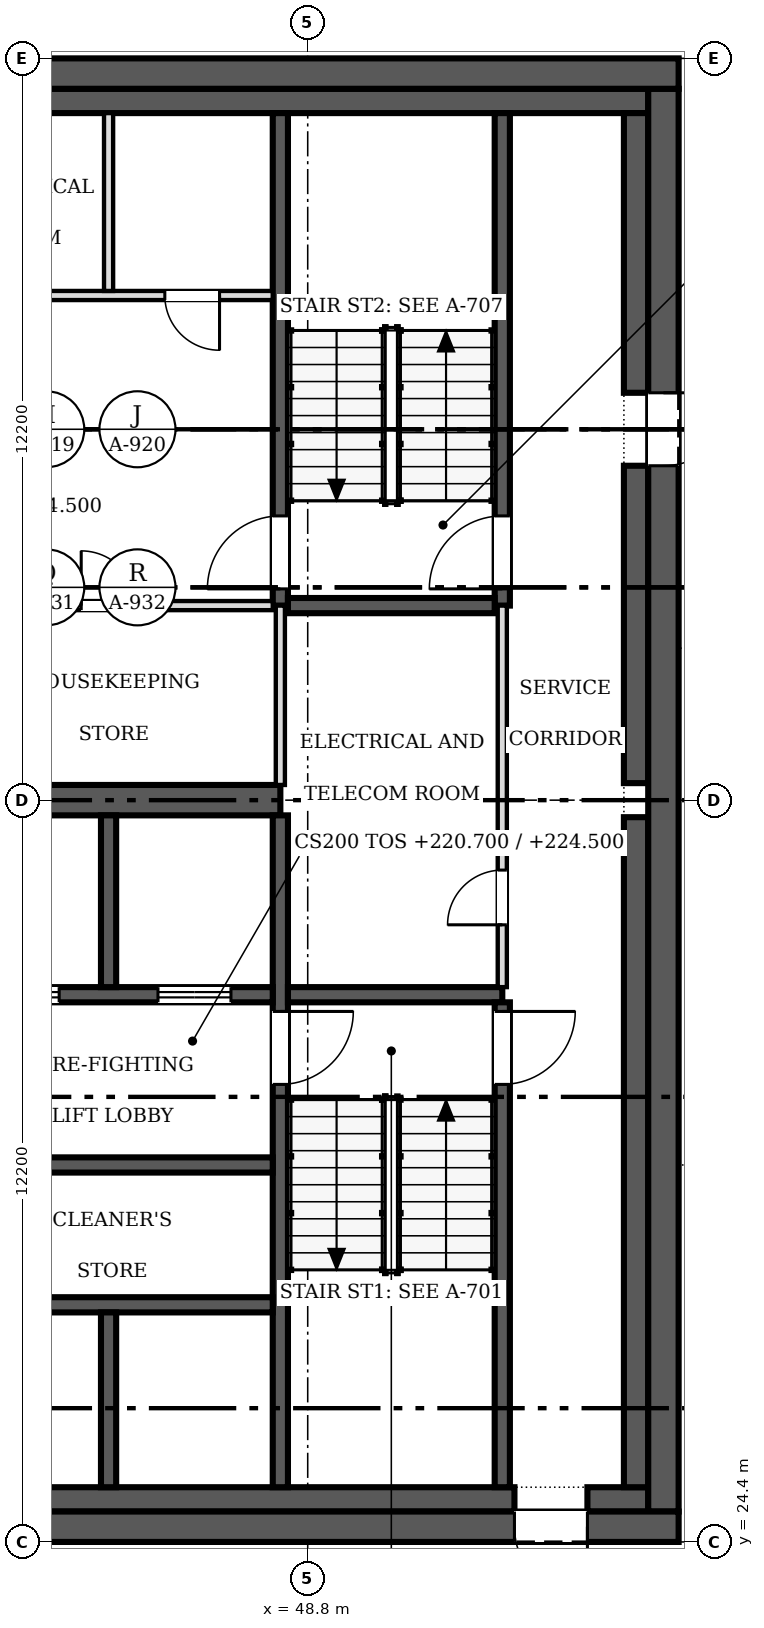
"""IFC4 building model, lengths in metres.
Left out: names, types, materials, properties, quantities, classifications, styles, units other than length and angle.
Written with IfcOpenShell. Run it as: python <this file> out.ifc"""

import sys

from ifc_helpers import new_model, si_unit, direction, frame, frame_2d, origin, place, context, subcontext, project, spatial, rectangle, extrude, source, transform, mapped, element, fill, save


model = new_model("IFC4")
c1 = context("Model", 3, precision=1e-05, world=origin(), true_north=direction((0.0, 1.0)))
c2 = subcontext(c1, "Body", "Model", "MODEL_VIEW")
j1 = project(units=[si_unit("LENGTHUNIT", "METRE"), si_unit("PLANEANGLEUNIT", "RADIAN")], contexts=[c1])
p1 = place(None, origin())
s1 = spatial("IfcSite", under=j1, at=p1, CompositionType="ELEMENT")
p2 = place(p1, origin())
s2 = spatial("IfcBuilding", under=s1, at=p2, CompositionType="ELEMENT")
p3 = place(p2, frame((0.0, 0.0, 220.7)))
s3 = spatial("IfcBuildingStorey", under=s2, at=p3, CompositionType="ELEMENT", Elevation=220.7)
p4 = place(p3, frame((54.9, 24.65, 0.0), z_axis=(0.0, 0.0, 1.0), x_axis=(-1.0, 0.0, 0.0)))
e1 = element("IfcWall", 1, at=p4, inside=s3, PredefinedType="SHEAR", context=c2, shape_type="SweptSolid", body=[
    extrude(rectangle(XDim=24.4, YDim=0.5, at=frame_2d((12.2, 0.0))), origin(), (0.0, 0.0, 1.0), 3.8),
])
m1 = source(origin(), c2, "Body", "SweptSolid", [
    extrude(rectangle(XDim=1.2, YDim=2.1, at=frame_2d((0.6, 1.05))), frame((0.0, 0.26, 0.0), z_axis=(0.0, -1.0, 0.0), x_axis=(1.0, 0.0, 0.0)), (0.0, 0.0, 1.0), 0.52),
])
p5 = place(p4, frame((1.5, 0.0, 0.0)))
e2 = element("IfcOpeningElement", 2, at=p5, cuts=e1, PredefinedType="OPENING", context=c2, shape_type="MappedRepresentation", body=[
    mapped(m1, transform((0.0, 0.0, 0.0), scale=1.0)),
])
p6 = place(p3, frame((30.5, 48.55, 0.0), z_axis=(0.0, 0.0, 1.0), x_axis=(1.0, 0.0, 0.0)))
e3 = element("IfcWall", 3, at=p6, inside=s3, PredefinedType="SHEAR", context=c2, shape_type="SweptSolid", body=[
    extrude(rectangle(XDim=24.4, YDim=0.5, at=frame_2d((12.2, 0.0))), origin(), (0.0, 0.0, 1.0), 3.8),
])
p7 = place(p3, frame((54.65, 48.3, 0.0), z_axis=(0.0, 0.0, 1.0), x_axis=(0.0, -1.0, 0.0)))
e4 = element("IfcWall", 4, at=p7, inside=s3, PredefinedType="SHEAR", context=c2, shape_type="SweptSolid", body=[
    extrude(rectangle(XDim=23.4, YDim=0.5, at=frame_2d((11.7, 0.0))), origin(), (0.0, 0.0, 1.0), 3.8),
])
p8 = place(p7, frame((5.0, 0.0, 0.0)))
e5 = element("IfcOpeningElement", 5, at=p8, cuts=e4, PredefinedType="OPENING", context=c2, shape_type="MappedRepresentation", body=[
    mapped(m1, transform((0.0, 0.0, 0.0), scale=1.0)),
])
p9 = place(p3, frame((31.0, 25.1, 0.0), z_axis=(0.0, 0.0, 1.0), x_axis=(1.0, 0.0, 0.0)))
e6 = element("IfcWall", 6, at=p9, inside=s3, PredefinedType="SOLIDWALL", context=c2, shape_type="SweptSolid", body=[
    extrude(rectangle(XDim=21.2, YDim=0.4, at=frame_2d((10.6, 0.0))), origin(), (0.0, 0.0, 1.0), 3.8),
])
p10 = place(p3, frame((53.4, 25.1, 0.0), z_axis=(0.0, 0.0, 1.0), x_axis=(1.0, 0.0, 0.0)))
e7 = element("IfcWall", 7, at=p10, inside=s3, PredefinedType="SOLIDWALL", context=c2, shape_type="SweptSolid", body=[
    extrude(rectangle(XDim=1.0, YDim=0.4, at=frame_2d((0.5, 0.0))), origin(), (0.0, 0.0, 1.0), 3.8),
])
p11 = place(p3, frame((31.0, 48.1, 0.0), z_axis=(0.0, 0.0, 1.0), x_axis=(1.0, 0.0, 0.0)))
e8 = element("IfcWall", 8, at=p11, inside=s3, PredefinedType="SOLIDWALL", context=c2, shape_type="SweptSolid", body=[
    extrude(rectangle(XDim=23.4, YDim=0.4, at=frame_2d((11.7, 0.0))), origin(), (0.0, 0.0, 1.0), 3.8),
])
p12 = place(p3, frame((54.2, 25.3, 0.0), z_axis=(0.0, 0.0, 1.0), x_axis=(0.0, 1.0, 0.0)))
e9 = element("IfcWall", 9, at=p12, inside=s3, PredefinedType="SOLIDWALL", context=c2, shape_type="SweptSolid", body=[
    extrude(rectangle(XDim=11.02, YDim=0.4, at=frame_2d((5.51, 0.0))), origin(), (0.0, 0.0, 1.0), 3.8),
])
p13 = place(p3, frame((54.2, 36.88, 0.0), z_axis=(0.0, 0.0, 1.0), x_axis=(0.0, 1.0, 0.0)))
e10 = element("IfcWall", 10, at=p13, inside=s3, PredefinedType="SOLIDWALL", context=c2, shape_type="SweptSolid", body=[
    extrude(rectangle(XDim=5.22, YDim=0.4, at=frame_2d((2.61, 0.0))), origin(), (0.0, 0.0, 1.0), 3.8),
])
p14 = place(p3, frame((54.2, 43.3, 0.0), z_axis=(0.0, 0.0, 1.0), x_axis=(0.0, 1.0, 0.0)))
e11 = element("IfcWall", 11, at=p14, inside=s3, PredefinedType="SOLIDWALL", context=c2, shape_type="SweptSolid", body=[
    extrude(rectangle(XDim=4.6, YDim=0.4, at=frame_2d((2.3, 0.0))), origin(), (0.0, 0.0, 1.0), 3.8),
])
p15 = place(p3, frame((31.4, 36.6, 0.0), z_axis=(0.0, 0.0, 1.0), x_axis=(1.0, 0.0, 0.0)))
e12 = element("IfcWall", 12, at=p15, inside=s3, PredefinedType="SHEAR", context=c2, shape_type="SweptSolid", body=[
    extrude(rectangle(XDim=16.95, YDim=0.5, at=frame_2d((8.475, 0.0))), origin(), (0.0, 0.0, 1.0), 3.8),
])
p16 = place(p3, frame((48.35, 36.35, 0.0), z_axis=(0.0, 0.0, 1.0), x_axis=(0.0, -1.0, 0.0)))
e13 = element("IfcWall", 13, at=p16, inside=s3, PredefinedType="SOLIDWALL", context=c2, shape_type="SweptSolid", body=[
    extrude(rectangle(XDim=11.05, YDim=0.25, at=frame_2d((5.525, 0.0))), origin(), (0.0, 0.0, 1.0), 3.8),
])
m2 = source(origin(), c2, "Body", "SweptSolid", [
    extrude(rectangle(XDim=1.2, YDim=2.1, at=frame_2d((0.6, 1.05))), frame((0.0, 0.135, 0.0), z_axis=(0.0, -1.0, 0.0), x_axis=(1.0, 0.0, 0.0)), (0.0, 0.0, 1.0), 0.27),
])
p17 = place(p16, frame((3.225, 0.0, 0.0)))
e14 = element("IfcOpeningElement", 14, at=p17, cuts=e13, PredefinedType="OPENING", context=c2, shape_type="MappedRepresentation", body=[
    mapped(m2, transform((0.0, 0.0, 0.0), scale=1.0)),
])
p18 = place(p3, frame((48.225, 33.4, 0.0), z_axis=(0.0, 0.0, 1.0), x_axis=(-1.0, 0.0, 0.0)))
e15 = element("IfcWall", 15, at=p18, inside=s3, PredefinedType="SOLIDWALL", context=c2, shape_type="SweptSolid", body=[
    extrude(rectangle(XDim=5.275, YDim=0.25, at=frame_2d((2.638, 0.0))), origin(), (0.0, 0.0, 1.0), 3.8),
])
p19 = place(p18, frame((3.512, 0.0, 0.0)))
e16 = element("IfcOpeningElement", 16, at=p19, cuts=e15, PredefinedType="OPENING", context=c2, shape_type="MappedRepresentation", body=[
    mapped(m2, transform((0.0, 0.0, 0.0), scale=1.0)),
])
p20 = place(p18, frame((0.688, 0.0, 0.0)))
e17 = element("IfcOpeningElement", 17, at=p20, cuts=e15, PredefinedType="OPENING", context=c2, shape_type="MappedRepresentation", body=[
    mapped(m2, transform((0.0, 0.0, 0.0), scale=1.0)),
])
p21 = place(p3, frame((48.475, 33.4, 0.0), z_axis=(0.0, 0.0, 1.0), x_axis=(1.0, 0.0, 0.0)))
e18 = element("IfcWall", 18, at=p21, inside=s3, PredefinedType="SOLIDWALL", context=c2, shape_type="SweptSolid", body=[
    extrude(rectangle(XDim=3.525, YDim=0.25, at=frame_2d((1.762, 0.0))), origin(), (0.0, 0.0, 1.0), 3.8),
])
p22 = place(p3, frame((48.35, 47.9, 0.0), z_axis=(0.0, 0.0, 1.0), x_axis=(0.0, -1.0, 0.0)))
e19 = element("IfcWall", 19, at=p22, inside=s3, PredefinedType="SOLIDWALL", context=c2, shape_type="SweptSolid", body=[
    extrude(rectangle(XDim=8.1, YDim=0.25, at=frame_2d((4.05, 0.0))), origin(), (0.0, 0.0, 1.0), 3.8),
])
p23 = place(p22, frame((6.625, 0.0, 0.0)))
e20 = element("IfcOpeningElement", 20, at=p23, cuts=e19, PredefinedType="OPENING", context=c2, shape_type="MappedRepresentation", body=[
    mapped(m2, transform((0.0, 0.0, 0.0), scale=1.0)),
])
p24 = place(p3, frame((52.0, 25.3, 0.0), z_axis=(0.0, 0.0, 1.0), x_axis=(0.0, 1.0, 0.0)))
e21 = element("IfcWall", 21, at=p24, inside=s3, PredefinedType="SOLIDWALL", context=c2, shape_type="SweptSolid", body=[
    extrude(rectangle(XDim=7.975, YDim=0.25, at=frame_2d((3.987, 0.0))), origin(), (0.0, 0.0, 1.0), 3.8),
])
p25 = place(p24, frame((6.625, 0.0, 0.0)))
e22 = element("IfcOpeningElement", 22, at=p25, cuts=e21, PredefinedType="OPENING", context=c2, shape_type="MappedRepresentation", body=[
    mapped(m2, transform((0.0, 0.0, 0.0), scale=1.0)),
])
p26 = place(p3, frame((52.0, 39.8, 0.0), z_axis=(0.0, 0.0, 1.0), x_axis=(0.0, 1.0, 0.0)))
e23 = element("IfcWall", 23, at=p26, inside=s3, PredefinedType="SOLIDWALL", context=c2, shape_type="SweptSolid", body=[
    extrude(rectangle(XDim=8.1, YDim=0.25, at=frame_2d((4.05, 0.0))), origin(), (0.0, 0.0, 1.0), 3.8),
])
p27 = place(p26, frame((0.275, 0.0, 0.0)))
e24 = element("IfcOpeningElement", 24, at=p27, cuts=e23, PredefinedType="OPENING", context=c2, shape_type="MappedRepresentation", body=[
    mapped(m2, transform((0.0, 0.0, 0.0), scale=1.0)),
])
for number, where, z_axis, x_axis in (
    (25, (42.95, 28.3, 0.0), (0.0, 0.0, 1.0), (1.0, 0.0, 0.0)),
    (26, (42.95, 30.6, 0.0), (0.0, 0.0, 1.0), (1.0, 0.0, 0.0)),
):
    element("IfcWall", number, at=place(p3, frame(where, z_axis=z_axis, x_axis=x_axis)), inside=s3, PredefinedType="SOLIDWALL", context=c2, shape_type="SweptSolid", body=[
        extrude(rectangle(XDim=5.275, YDim=0.25, at=frame_2d((2.638, 0.0))), origin(), (0.0, 0.0, 1.0), 3.8),
    ])
p28 = place(p3, frame((48.475, 39.8, 0.0), z_axis=(0.0, 0.0, 1.0), x_axis=(1.0, 0.0, 0.0)))
e27 = element("IfcWall", 27, at=p28, inside=s3, PredefinedType="SOLIDWALL", context=c2, shape_type="SweptSolid", body=[
    extrude(rectangle(XDim=3.4, YDim=0.25, at=frame_2d((1.7, 0.0))), origin(), (0.0, 0.0, 1.0), 3.8),
])
p29 = place(p3, frame((45.525, 33.525, 0.0), z_axis=(0.0, 0.0, 1.0), x_axis=(0.0, 1.0, 0.0)))
e28 = element("IfcWall", 28, at=p29, inside=s3, PredefinedType="SOLIDWALL", context=c2, shape_type="SweptSolid", body=[
    extrude(rectangle(XDim=2.825, YDim=0.25, at=frame_2d((1.413, 0.0))), origin(), (0.0, 0.0, 1.0), 3.8),
])
p30 = place(p3, frame((45.525, 25.3, 0.0), z_axis=(0.0, 0.0, 1.0), x_axis=(0.0, 1.0, 0.0)))
e29 = element("IfcWall", 29, at=p30, inside=s3, PredefinedType="SOLIDWALL", context=c2, shape_type="SweptSolid", body=[
    extrude(rectangle(XDim=2.875, YDim=0.25, at=frame_2d((1.438, 0.0))), origin(), (0.0, 0.0, 1.0), 3.8),
])
p31 = place(p3, frame((52.0, 33.525, 0.0), z_axis=(0.0, 0.0, 1.0), x_axis=(0.0, 1.0, 0.0)))
e30 = element("IfcWall", 30, at=p31, inside=s3, PredefinedType="PARTITIONING", context=c2, shape_type="SweptSolid", body=[
    extrude(rectangle(XDim=6.275, YDim=0.15, at=frame_2d((3.138, 0.0))), origin(), (0.0, 0.0, 1.0), 3.6),
])
m3 = source(origin(), c2, "Body", "SweptSolid", [
    extrude(rectangle(XDim=0.9, YDim=2.1, at=frame_2d((0.45, 1.05))), frame((0.0, 0.085, 0.0), z_axis=(0.0, -1.0, 0.0), x_axis=(1.0, 0.0, 0.0)), (0.0, 0.0, 1.0), 0.17),
])
p32 = place(p31, frame((1.025, 0.0, 0.0)))
e31 = element("IfcOpeningElement", 31, at=p32, cuts=e30, PredefinedType="OPENING", context=c2, shape_type="MappedRepresentation", body=[
    mapped(m3, transform((0.0, 0.0, 0.0), scale=1.0)),
])
p33 = place(p3, frame((48.225, 39.8, 0.0), z_axis=(0.0, 0.0, 1.0), x_axis=(-1.0, 0.0, 0.0)))
e32 = element("IfcWall", 32, at=p33, inside=s3, PredefinedType="PARTITIONING", context=c2, shape_type="SweptSolid", body=[
    extrude(rectangle(XDim=5.275, YDim=0.15, at=frame_2d((2.638, 0.0))), origin(), (0.0, 0.0, 1.0), 3.6),
])
p34 = place(p33, frame((2.25, 0.0, 0.0)))
e33 = element("IfcOpeningElement", 33, at=p34, cuts=e32, PredefinedType="OPENING", context=c2, shape_type="MappedRepresentation", body=[
    mapped(m3, transform((0.0, 0.0, 0.0), scale=1.0)),
])
p35 = place(p3, frame((42.95, 44.9, 0.0), z_axis=(0.0, 0.0, 1.0), x_axis=(1.0, 0.0, 0.0)))
e34 = element("IfcWall", 34, at=p35, inside=s3, PredefinedType="PARTITIONING", context=c2, shape_type="SweptSolid", body=[
    extrude(rectangle(XDim=5.275, YDim=0.15, at=frame_2d((2.638, 0.0))), origin(), (0.0, 0.0, 1.0), 3.6),
])
p36 = place(p35, frame((0.712, 0.0, 0.0)))
e35 = element("IfcOpeningElement", 35, at=p36, cuts=e34, PredefinedType="OPENING", context=c2, shape_type="MappedRepresentation", body=[
    mapped(m3, transform((0.0, 0.0, 0.0), scale=1.0)),
])
p37 = place(p35, frame((3.5, 0.0, 0.0)))
e36 = element("IfcOpeningElement", 36, at=p37, cuts=e34, PredefinedType="OPENING", context=c2, shape_type="MappedRepresentation", body=[
    mapped(m3, transform((0.0, 0.0, 0.0), scale=1.0)),
])
p38 = place(p3, frame((48.35, 36.85, 0.0), z_axis=(0.0, 0.0, 1.0), x_axis=(0.0, 1.0, 0.0)))
e37 = element("IfcWall", 37, at=p38, inside=s3, PredefinedType="PARTITIONING", context=c2, shape_type="SweptSolid", body=[
    extrude(rectangle(XDim=2.95, YDim=0.15, at=frame_2d((1.475, 0.0))), origin(), (0.0, 0.0, 1.0), 3.6),
])
p39 = place(p3, frame((45.525, 44.975, 0.0), z_axis=(0.0, 0.0, 1.0), x_axis=(0.0, 1.0, 0.0)))
e38 = element("IfcWall", 38, at=p39, inside=s3, PredefinedType="PARTITIONING", context=c2, shape_type="SweptSolid", body=[
    extrude(rectangle(XDim=2.925, YDim=0.15, at=frame_2d((1.462, 0.0))), origin(), (0.0, 0.0, 1.0), 3.6),
])
m4 = source(origin(), c2, "Body", "SweptSolid", [
    extrude(rectangle(XDim=1.2, YDim=2.1, at=frame_2d((0.6, 1.05))), frame((0.0, 0.025, 0.0), z_axis=(0.0, -1.0, 0.0), x_axis=(1.0, 0.0, 0.0)), (0.0, 0.0, 1.0), 0.05),
])
p40 = place(p5, origin())
e39 = element("IfcDoor", 39, at=p40, inside=s3, OperationType="SINGLE_SWING_LEFT", PredefinedType="DOOR", context=c2, shape_type="MappedRepresentation", body=[
    mapped(m4, transform((0.0, 0.0, 0.0), scale=1.0)),
])
fill(e2, e39)
p41 = place(p8, origin())
e40 = element("IfcDoor", 40, at=p41, inside=s3, OperationType="SINGLE_SWING_LEFT", PredefinedType="DOOR", context=c2, shape_type="MappedRepresentation", body=[
    mapped(m4, transform((0.0, 0.0, 0.0), scale=1.0)),
])
fill(e5, e40)
p42 = place(p17, origin())
e41 = element("IfcDoor", 41, at=p42, inside=s3, OperationType="SINGLE_SWING_LEFT", PredefinedType="DOOR", context=c2, shape_type="MappedRepresentation", body=[
    mapped(m4, transform((0.0, 0.0, 0.0), scale=1.0)),
])
fill(e14, e41)
p43 = place(p19, origin())
e42 = element("IfcDoor", 42, at=p43, inside=s3, OperationType="DOUBLE_DOOR_SLIDING", PredefinedType="DOOR", context=c2, shape_type="MappedRepresentation", body=[
    mapped(m4, transform((0.0, 0.0, 0.0), scale=1.0)),
])
fill(e16, e42)
p44 = place(p20, origin())
e43 = element("IfcDoor", 43, at=p44, inside=s3, OperationType="DOUBLE_DOOR_SLIDING", PredefinedType="DOOR", context=c2, shape_type="MappedRepresentation", body=[
    mapped(m4, transform((0.0, 0.0, 0.0), scale=1.0)),
])
fill(e17, e43)
p45 = place(p23, origin())
e44 = element("IfcDoor", 44, at=p45, inside=s3, OperationType="SINGLE_SWING_RIGHT", PredefinedType="DOOR", context=c2, shape_type="MappedRepresentation", body=[
    mapped(m4, transform((0.0, 0.0, 0.0), scale=1.0)),
])
fill(e20, e44)
p46 = place(p25, origin())
e45 = element("IfcDoor", 45, at=p46, inside=s3, OperationType="SINGLE_SWING_RIGHT", PredefinedType="DOOR", context=c2, shape_type="MappedRepresentation", body=[
    mapped(m4, transform((0.0, 0.0, 0.0), scale=1.0)),
])
fill(e22, e45)
p47 = place(p27, origin())
e46 = element("IfcDoor", 46, at=p47, inside=s3, OperationType="SINGLE_SWING_LEFT", PredefinedType="DOOR", context=c2, shape_type="MappedRepresentation", body=[
    mapped(m4, transform((0.0, 0.0, 0.0), scale=1.0)),
])
fill(e24, e46)
m5 = source(origin(), c2, "Body", "SweptSolid", [
    extrude(rectangle(XDim=0.9, YDim=2.1, at=frame_2d((0.45, 1.05))), frame((0.0, 0.025, 0.0), z_axis=(0.0, -1.0, 0.0), x_axis=(1.0, 0.0, 0.0)), (0.0, 0.0, 1.0), 0.05),
])
p48 = place(p32, origin())
e47 = element("IfcDoor", 47, at=p48, inside=s3, OperationType="SINGLE_SWING_LEFT", PredefinedType="DOOR", context=c2, shape_type="MappedRepresentation", body=[
    mapped(m5, transform((0.0, 0.0, 0.0), scale=1.0)),
])
fill(e31, e47)
p49 = place(p34, origin())
e48 = element("IfcDoor", 48, at=p49, inside=s3, OperationType="SINGLE_SWING_RIGHT", PredefinedType="DOOR", context=c2, shape_type="MappedRepresentation", body=[
    mapped(m5, transform((0.0, 0.0, 0.0), scale=1.0)),
])
fill(e33, e48)
p50 = place(p37, origin())
e49 = element("IfcDoor", 49, at=p50, inside=s3, OperationType="SINGLE_SWING_RIGHT", PredefinedType="DOOR", context=c2, shape_type="MappedRepresentation", body=[
    mapped(m5, transform((0.0, 0.0, 0.0), scale=1.0)),
])
fill(e36, e49)
save(model, sys.argv[1])
